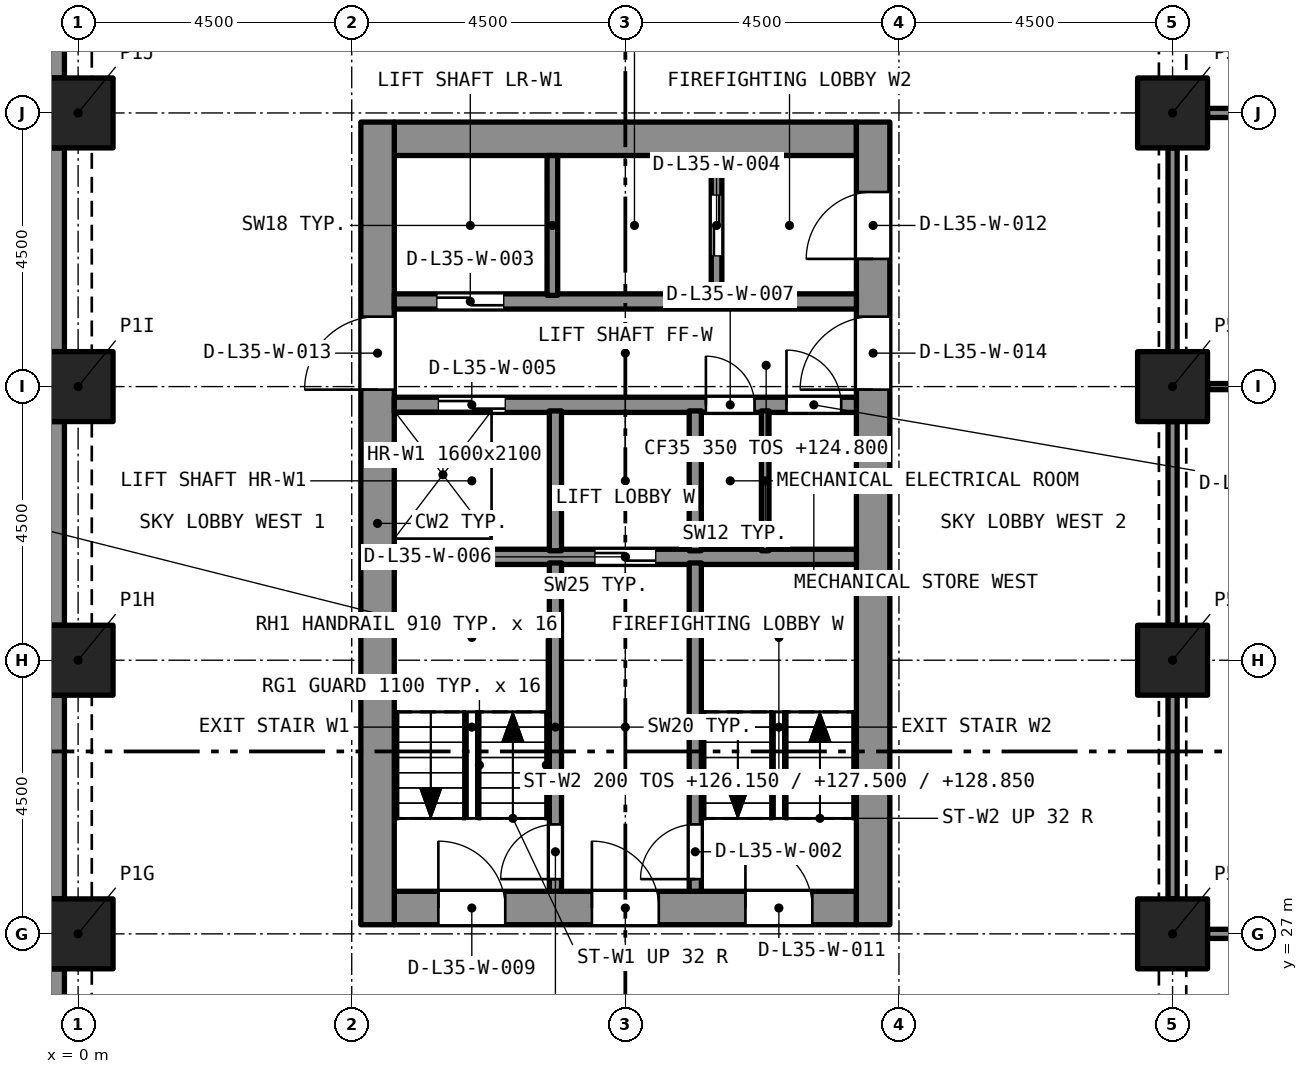
"""IFC4 building model, lengths in metres.
Left out: names, types, materials, properties, quantities, classifications, styles, units other than length and angle.
Written with IfcOpenShell. Run it as: python <this file> out.ifc"""

import sys

from ifc_helpers import new_model, si_unit, direction, frame, frame_2d, origin, origin_2d, place, context, subcontext, project, spatial, rectangle, extrude, element, fill, save


model = new_model("IFC4")
c1 = context("Model", 3, precision=1e-05, world=origin(), true_north=direction((0.0, 1.0)))
c2 = subcontext(c1, "Body", "Model", "MODEL_VIEW")
j1 = project(units=[si_unit("LENGTHUNIT", "METRE"), si_unit("PLANEANGLEUNIT", "RADIAN")], contexts=[c1])
p1 = place(None, origin())
s1 = spatial("IfcSite", under=j1, at=p1, CompositionType="ELEMENT")
p2 = place(p1, origin())
s2 = spatial("IfcBuilding", under=s1, at=p2, CompositionType="ELEMENT")
p3 = place(p2, frame((0.0, 0.0, 124.8)))
s3 = spatial("IfcBuildingStorey", under=s2, at=p3, CompositionType="ELEMENT", Elevation=124.8)
for number, where, z_axis, x_axis in (
    (1, (0.0, 27.0, 0.0), (0.0, 0.0, 1.0), (1.0, 0.0, 0.0)),
    (2, (18.0, 27.0, 0.0), (0.0, 0.0, 1.0), (1.0, 0.0, 0.0)),
    (3, (0.0, 31.5, 0.0), (0.0, 0.0, 1.0), (1.0, 0.0, 0.0)),
    (4, (18.0, 31.5, 0.0), (0.0, 0.0, 1.0), (1.0, 0.0, 0.0)),
    (5, (0.0, 36.0, 0.0), (0.0, 0.0, 1.0), (1.0, 0.0, 0.0)),
    (6, (18.0, 36.0, 0.0), (0.0, 0.0, 1.0), (1.0, 0.0, 0.0)),
    (7, (0.0, 40.5, 0.0), (0.0, 0.0, 1.0), (1.0, 0.0, 0.0)),
    (8, (18.0, 40.5, 0.0), (0.0, 0.0, 1.0), (1.0, 0.0, 0.0)),
):
    element("IfcColumn", number, at=place(p3, frame(where, z_axis=z_axis, x_axis=x_axis)), inside=s3, PredefinedType="COLUMN", context=c2, shape_type="SweptSolid", body=[
        extrude(rectangle(XDim=1.15, YDim=1.15, at=origin_2d()), origin(), (0.0, 0.0, 1.0), 5.4),
    ])
p4 = place(p3, frame((5.2, 27.425, 0.0), z_axis=(0.0, 0.0, 1.0), x_axis=(1.0, 0.0, 0.0)))
e9 = element("IfcWall", 9, at=p4, inside=s3, PredefinedType="SOLIDWALL", context=c2, shape_type="SweptSolid", body=[
    extrude(rectangle(XDim=7.6, YDim=0.55, at=frame_2d((3.8, 0.0))), origin(), (0.0, 0.0, 1.0), 5.4),
])
p5 = place(p4, frame((0.725, 0.0, 0.0)))
e10 = element("IfcOpeningElement", 10, at=p5, cuts=e9, PredefinedType="OPENING", context=c2, shape_type="SweptSolid", body=[
    extrude(rectangle(XDim=1.1, YDim=2.1, at=frame_2d((0.55, 1.05))), frame((0.0, 0.285, 0.0), z_axis=(0.0, -1.0, 0.0), x_axis=(1.0, 0.0, 0.0)), (0.0, 0.0, 1.0), 0.57),
])
p6 = place(p4, frame((3.25, 0.0, 0.0)))
e11 = element("IfcOpeningElement", 11, at=p6, cuts=e9, PredefinedType="OPENING", context=c2, shape_type="SweptSolid", body=[
    extrude(rectangle(XDim=1.1, YDim=2.1, at=frame_2d((0.55, 1.05))), frame((0.0, 0.285, 0.0), z_axis=(0.0, -1.0, 0.0), x_axis=(1.0, 0.0, 0.0)), (0.0, 0.0, 1.0), 0.57),
])
p7 = place(p4, frame((5.775, 0.0, 0.0)))
e12 = element("IfcOpeningElement", 12, at=p7, cuts=e9, PredefinedType="OPENING", context=c2, shape_type="SweptSolid", body=[
    extrude(rectangle(XDim=1.1, YDim=2.1, at=frame_2d((0.55, 1.05))), frame((0.0, 0.285, 0.0), z_axis=(0.0, -1.0, 0.0), x_axis=(1.0, 0.0, 0.0)), (0.0, 0.0, 1.0), 0.57),
])
p8 = place(p3, frame((5.2, 40.075, 0.0), z_axis=(0.0, 0.0, 1.0), x_axis=(1.0, 0.0, 0.0)))
e13 = element("IfcWall", 13, at=p8, inside=s3, PredefinedType="SOLIDWALL", context=c2, shape_type="SweptSolid", body=[
    extrude(rectangle(XDim=7.6, YDim=0.55, at=frame_2d((3.8, 0.0))), origin(), (0.0, 0.0, 1.0), 5.4),
])
p9 = place(p3, frame((4.925, 27.15, 0.0), z_axis=(0.0, 0.0, 1.0), x_axis=(0.0, 1.0, 0.0)))
e14 = element("IfcWall", 14, at=p9, inside=s3, PredefinedType="SOLIDWALL", context=c2, shape_type="SweptSolid", body=[
    extrude(rectangle(XDim=13.2, YDim=0.55, at=frame_2d((6.6, 0.0))), origin(), (0.0, 0.0, 1.0), 5.4),
])
p10 = place(p9, frame((8.8, 0.0, 0.0)))
e15 = element("IfcOpeningElement", 15, at=p10, cuts=e14, PredefinedType="OPENING", context=c2, shape_type="SweptSolid", body=[
    extrude(rectangle(XDim=1.2, YDim=2.1, at=frame_2d((0.6, 1.05))), frame((0.0, 0.285, 0.0), z_axis=(0.0, -1.0, 0.0), x_axis=(1.0, 0.0, 0.0)), (0.0, 0.0, 1.0), 0.57),
])
p11 = place(p3, frame((13.075, 27.15, 0.0), z_axis=(0.0, 0.0, 1.0), x_axis=(0.0, 1.0, 0.0)))
e16 = element("IfcWall", 16, at=p11, inside=s3, PredefinedType="SOLIDWALL", context=c2, shape_type="SweptSolid", body=[
    extrude(rectangle(XDim=13.2, YDim=0.55, at=frame_2d((6.6, 0.0))), origin(), (0.0, 0.0, 1.0), 5.4),
])
p12 = place(p11, frame((10.95, 0.0, 0.0)))
e17 = element("IfcOpeningElement", 17, at=p12, cuts=e16, PredefinedType="OPENING", context=c2, shape_type="SweptSolid", body=[
    extrude(rectangle(XDim=1.1, YDim=2.1, at=frame_2d((0.55, 1.05))), frame((0.0, 0.285, 0.0), z_axis=(0.0, -1.0, 0.0), x_axis=(1.0, 0.0, 0.0)), (0.0, 0.0, 1.0), 0.57),
])
p13 = place(p11, frame((8.8, 0.0, 0.0)))
e18 = element("IfcOpeningElement", 18, at=p13, cuts=e16, PredefinedType="OPENING", context=c2, shape_type="SweptSolid", body=[
    extrude(rectangle(XDim=1.2, YDim=2.1, at=frame_2d((0.6, 1.05))), frame((0.0, 0.285, 0.0), z_axis=(0.0, -1.0, 0.0), x_axis=(1.0, 0.0, 0.0)), (0.0, 0.0, 1.0), 0.57),
])
for number, where, z_axis, x_axis in (
    (19, (-0.375, 41.075, 0.0), (0.0, 0.0, 1.0), (0.0, 1.0, 0.0)),
    (20, (-0.375, 36.575, 0.0), (0.0, 0.0, 1.0), (0.0, 1.0, 0.0)),
    (21, (-0.375, 32.075, 0.0), (0.0, 0.0, 1.0), (0.0, 1.0, 0.0)),
    (22, (-0.375, 27.575, 0.0), (0.0, 0.0, 1.0), (0.0, 1.0, 0.0)),
    (23, (-0.375, 23.075, 0.0), (0.0, 0.0, 1.0), (0.0, 1.0, 0.0)),
):
    element("IfcWall", number, at=place(p3, frame(where, z_axis=z_axis, x_axis=x_axis)), inside=s3, PredefinedType="SOLIDWALL", context=c2, shape_type="SweptSolid", body=[
        extrude(rectangle(XDim=3.35, YDim=0.3, at=frame_2d((1.675, 0.0))), origin(), (0.0, 0.0, 1.0), 5.4),
    ])
p14 = place(p3, frame((5.2, 33.2, 0.0), z_axis=(0.0, 0.0, 1.0), x_axis=(1.0, 0.0, 0.0)))
e24 = element("IfcWall", 24, at=p14, inside=s3, PredefinedType="SOLIDWALL", context=c2, shape_type="SweptSolid", body=[
    extrude(rectangle(XDim=7.6, YDim=0.25, at=frame_2d((3.8, 0.0))), origin(), (0.0, 0.0, 1.0), 5.1),
])
p15 = place(p14, frame((3.3, 0.0, 0.0)))
e25 = element("IfcOpeningElement", 25, at=p15, cuts=e24, PredefinedType="OPENING", context=c2, shape_type="SweptSolid", body=[
    extrude(rectangle(XDim=1.0, YDim=2.1, at=frame_2d((0.5, 1.05))), frame((0.0, 0.135, 0.0), z_axis=(0.0, -1.0, 0.0), x_axis=(1.0, 0.0, 0.0)), (0.0, 0.0, 1.0), 0.27),
])
p16 = place(p3, frame((5.2, 35.7, 0.0), z_axis=(0.0, 0.0, 1.0), x_axis=(1.0, 0.0, 0.0)))
e26 = element("IfcWall", 26, at=p16, inside=s3, PredefinedType="SOLIDWALL", context=c2, shape_type="SweptSolid", body=[
    extrude(rectangle(XDim=7.6, YDim=0.25, at=frame_2d((3.8, 0.0))), origin(), (0.0, 0.0, 1.0), 5.1),
])
p17 = place(p16, frame((0.725, 0.0, 0.0)))
e27 = element("IfcOpeningElement", 27, at=p17, cuts=e26, PredefinedType="OPENING", context=c2, shape_type="SweptSolid", body=[
    extrude(rectangle(XDim=1.1, YDim=2.4, at=frame_2d((0.55, 1.2))), frame((0.0, 0.135, 0.0), z_axis=(0.0, -1.0, 0.0), x_axis=(1.0, 0.0, 0.0)), (0.0, 0.0, 1.0), 0.27),
])
p18 = place(p16, frame((5.125, 0.0, 0.0)))
e28 = element("IfcOpeningElement", 28, at=p18, cuts=e26, PredefinedType="OPENING", context=c2, shape_type="SweptSolid", body=[
    extrude(rectangle(XDim=0.8, YDim=2.1, at=frame_2d((0.4, 1.05))), frame((0.0, 0.135, 0.0), z_axis=(0.0, -1.0, 0.0), x_axis=(1.0, 0.0, 0.0)), (0.0, 0.0, 1.0), 0.27),
])
p19 = place(p16, frame((6.45, 0.0, 0.0)))
e29 = element("IfcOpeningElement", 29, at=p19, cuts=e26, PredefinedType="OPENING", context=c2, shape_type="SweptSolid", body=[
    extrude(rectangle(XDim=0.9, YDim=2.1, at=frame_2d((0.45, 1.05))), frame((0.0, 0.135, 0.0), z_axis=(0.0, -1.0, 0.0), x_axis=(1.0, 0.0, 0.0)), (0.0, 0.0, 1.0), 0.27),
])
p20 = place(p3, frame((5.2, 37.4, 0.0), z_axis=(0.0, 0.0, 1.0), x_axis=(1.0, 0.0, 0.0)))
e30 = element("IfcWall", 30, at=p20, inside=s3, PredefinedType="SOLIDWALL", context=c2, shape_type="SweptSolid", body=[
    extrude(rectangle(XDim=7.6, YDim=0.25, at=frame_2d((3.8, 0.0))), origin(), (0.0, 0.0, 1.0), 5.1),
])
p21 = place(p20, frame((0.7, 0.0, 0.0)))
e31 = element("IfcOpeningElement", 31, at=p21, cuts=e30, PredefinedType="OPENING", context=c2, shape_type="SweptSolid", body=[
    extrude(rectangle(XDim=1.1, YDim=2.4, at=frame_2d((0.55, 1.2))), frame((0.0, 0.135, 0.0), z_axis=(0.0, -1.0, 0.0), x_axis=(1.0, 0.0, 0.0)), (0.0, 0.0, 1.0), 0.27),
])
p22 = place(p3, frame((7.85, 27.7, 0.0), z_axis=(0.0, 0.0, 1.0), x_axis=(0.0, 1.0, 0.0)))
e32 = element("IfcWall", 32, at=p22, inside=s3, PredefinedType="SOLIDWALL", context=c2, shape_type="SweptSolid", body=[
    extrude(rectangle(XDim=5.4, YDim=0.2, at=frame_2d((2.7, 0.0))), origin(), (0.0, 0.0, 1.0), 5.1),
])
p23 = place(p22, frame((0.2, 0.0, 0.0)))
e33 = element("IfcOpeningElement", 33, at=p23, cuts=e32, PredefinedType="OPENING", context=c2, shape_type="SweptSolid", body=[
    extrude(rectangle(XDim=0.9, YDim=2.1, at=frame_2d((0.45, 1.05))), frame((0.0, 0.11, 0.0), z_axis=(0.0, -1.0, 0.0), x_axis=(1.0, 0.0, 0.0)), (0.0, 0.0, 1.0), 0.22),
])
p24 = place(p3, frame((10.15, 27.7, 0.0), z_axis=(0.0, 0.0, 1.0), x_axis=(0.0, 1.0, 0.0)))
e34 = element("IfcWall", 34, at=p24, inside=s3, PredefinedType="SOLIDWALL", context=c2, shape_type="SweptSolid", body=[
    extrude(rectangle(XDim=5.4, YDim=0.2, at=frame_2d((2.7, 0.0))), origin(), (0.0, 0.0, 1.0), 5.1),
])
p25 = place(p24, frame((0.2, 0.0, 0.0)))
e35 = element("IfcOpeningElement", 35, at=p25, cuts=e34, PredefinedType="OPENING", context=c2, shape_type="SweptSolid", body=[
    extrude(rectangle(XDim=0.9, YDim=2.1, at=frame_2d((0.45, 1.05))), frame((0.0, 0.11, 0.0), z_axis=(0.0, -1.0, 0.0), x_axis=(1.0, 0.0, 0.0)), (0.0, 0.0, 1.0), 0.22),
])
for number, where, z_axis, x_axis in (
    (36, (7.85, 33.3, 0.0), (0.0, 0.0, 1.0), (0.0, 1.0, 0.0)),
    (37, (10.15, 33.3, 0.0), (0.0, 0.0, 1.0), (0.0, 1.0, 0.0)),
):
    element("IfcWall", number, at=place(p3, frame(where, z_axis=z_axis, x_axis=x_axis)), inside=s3, PredefinedType="SOLIDWALL", context=c2, shape_type="SweptSolid", body=[
        extrude(rectangle(XDim=2.3, YDim=0.2, at=frame_2d((1.15, 0.0))), origin(), (0.0, 0.0, 1.0), 5.1),
    ])
p26 = place(p3, frame((7.8, 37.5, 0.0), z_axis=(0.0, 0.0, 1.0), x_axis=(0.0, 1.0, 0.0)))
e38 = element("IfcWall", 38, at=p26, inside=s3, PredefinedType="SOLIDWALL", context=c2, shape_type="SweptSolid", body=[
    extrude(rectangle(XDim=2.3, YDim=0.175, at=frame_2d((1.15, 0.0))), origin(), (0.0, 0.0, 1.0), 5.1),
])
p27 = place(p3, frame((10.5, 37.5, 0.0), z_axis=(0.0, 0.0, 1.0), x_axis=(0.0, 1.0, 0.0)))
e39 = element("IfcWall", 39, at=p27, inside=s3, PredefinedType="SOLIDWALL", context=c2, shape_type="SweptSolid", body=[
    extrude(rectangle(XDim=2.3, YDim=0.175, at=frame_2d((1.15, 0.0))), origin(), (0.0, 0.0, 1.0), 5.1),
])
p28 = place(p27, frame((0.65, 0.0, 0.0)))
e40 = element("IfcOpeningElement", 40, at=p28, cuts=e39, PredefinedType="OPENING", context=c2, shape_type="SweptSolid", body=[
    extrude(rectangle(XDim=1.0, YDim=2.1, at=frame_2d((0.5, 1.05))), frame((0.0, 0.097, 0.0), z_axis=(0.0, -1.0, 0.0), x_axis=(1.0, 0.0, 0.0)), (0.0, 0.0, 1.0), 0.195),
])
p29 = place(p3, frame((11.3, 33.3, 0.0), z_axis=(0.0, 0.0, 1.0), x_axis=(0.0, 1.0, 0.0)))
e41 = element("IfcWall", 41, at=p29, inside=s3, PredefinedType="PARTITIONING", context=c2, shape_type="SweptSolid", body=[
    extrude(rectangle(XDim=2.3, YDim=0.125, at=frame_2d((1.15, 0.0))), origin(), (0.0, 0.0, 1.0), 5.1),
])
p30 = place(p3, frame((18.575, 27.0, 0.0), z_axis=(0.0, 0.0, 1.0), x_axis=(1.0, 0.0, 0.0)))
e42 = element("IfcWall", 42, at=p30, inside=s3, PredefinedType="PARTITIONING", context=c2, shape_type="SweptSolid", body=[
    extrude(rectangle(XDim=12.35, YDim=0.15, at=frame_2d((6.175, 0.0))), origin(), (0.0, 0.0, 1.0), 4.95),
])
p31 = place(p30, frame((5.425, 0.0, 0.0)))
e43 = element("IfcOpeningElement", 43, at=p31, cuts=e42, PredefinedType="OPENING", context=c2, shape_type="SweptSolid", body=[
    extrude(rectangle(XDim=1.5, YDim=2.4, at=frame_2d((0.75, 1.2))), frame((0.0, 0.085, 0.0), z_axis=(0.0, -1.0, 0.0), x_axis=(1.0, 0.0, 0.0)), (0.0, 0.0, 1.0), 0.17),
])
p32 = place(p3, frame((18.575, 36.0, 0.0), z_axis=(0.0, 0.0, 1.0), x_axis=(1.0, 0.0, 0.0)))
e44 = element("IfcWall", 44, at=p32, inside=s3, PredefinedType="PARTITIONING", context=c2, shape_type="SweptSolid", body=[
    extrude(rectangle(XDim=12.35, YDim=0.1, at=frame_2d((6.175, 0.0))), origin(), (0.0, 0.0, 1.0), 4.95),
])
for number, where, z_axis, x_axis in (
    (45, (18.0, 27.575, 0.0), (0.0, 0.0, 1.0), (0.0, 1.0, 0.0)),
    (46, (18.0, 32.075, 0.0), (0.0, 0.0, 1.0), (0.0, 1.0, 0.0)),
):
    element("IfcWall", number, at=place(p3, frame(where, z_axis=z_axis, x_axis=x_axis)), inside=s3, PredefinedType="PARTITIONING", context=c2, shape_type="SweptSolid", body=[
        extrude(rectangle(XDim=3.35, YDim=0.15, at=frame_2d((1.675, 0.0))), origin(), (0.0, 0.0, 1.0), 4.58),
    ])
p33 = place(p3, frame((30.925, 40.5, 0.0), z_axis=(0.0, 0.0, 1.0), x_axis=(-1.0, 0.0, 0.0)))
e47 = element("IfcWall", 47, at=p33, inside=s3, PredefinedType="PARTITIONING", context=c2, shape_type="SweptSolid", body=[
    extrude(rectangle(XDim=12.35, YDim=0.15, at=frame_2d((6.175, 0.0))), origin(), (0.0, 0.0, 1.0), 4.95),
])
p34 = place(p33, frame((5.425, 0.0, 0.0)))
e48 = element("IfcOpeningElement", 48, at=p34, cuts=e47, PredefinedType="OPENING", context=c2, shape_type="SweptSolid", body=[
    extrude(rectangle(XDim=1.5, YDim=2.4, at=frame_2d((0.75, 1.2))), frame((0.0, 0.085, 0.0), z_axis=(0.0, -1.0, 0.0), x_axis=(1.0, 0.0, 0.0)), (0.0, 0.0, 1.0), 0.17),
])
p35 = place(p3, frame((18.0, 36.575, 0.0), z_axis=(0.0, 0.0, 1.0), x_axis=(0.0, 1.0, 0.0)))
e49 = element("IfcWall", 49, at=p35, inside=s3, PredefinedType="PARTITIONING", context=c2, shape_type="SweptSolid", body=[
    extrude(rectangle(XDim=3.35, YDim=0.15, at=frame_2d((1.675, 0.0))), origin(), (0.0, 0.0, 1.0), 4.58),
])
p36 = place(p23, origin())
e50 = element("IfcDoor", 50, at=p36, inside=s3, OperationType="SINGLE_SWING_LEFT", PredefinedType="DOOR", context=c2, shape_type="SweptSolid", body=[
    extrude(rectangle(XDim=0.9, YDim=2.1, at=frame_2d((0.45, 1.05))), frame((0.0, 0.025, 0.0), z_axis=(0.0, -1.0, 0.0), x_axis=(1.0, 0.0, 0.0)), (0.0, 0.0, 1.0), 0.05),
])
fill(e33, e50)
p37 = place(p25, origin())
e51 = element("IfcDoor", 51, at=p37, inside=s3, OperationType="SINGLE_SWING_LEFT", PredefinedType="DOOR", context=c2, shape_type="SweptSolid", body=[
    extrude(rectangle(XDim=0.9, YDim=2.1, at=frame_2d((0.45, 1.05))), frame((0.0, 0.025, 0.0), z_axis=(0.0, -1.0, 0.0), x_axis=(1.0, 0.0, 0.0)), (0.0, 0.0, 1.0), 0.05),
])
fill(e35, e51)
p38 = place(p21, origin())
e52 = element("IfcDoor", 52, at=p38, inside=s3, OperationType="SLIDING_TO_LEFT", PredefinedType="DOOR", context=c2, shape_type="SweptSolid", body=[
    extrude(rectangle(XDim=1.1, YDim=2.4, at=frame_2d((0.55, 1.2))), frame((0.0, 0.025, 0.0), z_axis=(0.0, -1.0, 0.0), x_axis=(1.0, 0.0, 0.0)), (0.0, 0.0, 1.0), 0.05),
])
fill(e31, e52)
p39 = place(p28, origin())
e53 = element("IfcDoor", 53, at=p39, inside=s3, OperationType="SLIDING_TO_LEFT", PredefinedType="DOOR", context=c2, shape_type="SweptSolid", body=[
    extrude(rectangle(XDim=1.0, YDim=2.1, at=frame_2d((0.5, 1.05))), frame((0.0, 0.025, 0.0), z_axis=(0.0, -1.0, 0.0), x_axis=(1.0, 0.0, 0.0)), (0.0, 0.0, 1.0), 0.05),
])
fill(e40, e53)
p40 = place(p17, origin())
e54 = element("IfcDoor", 54, at=p40, inside=s3, OperationType="SLIDING_TO_LEFT", PredefinedType="DOOR", context=c2, shape_type="SweptSolid", body=[
    extrude(rectangle(XDim=1.1, YDim=2.4, at=frame_2d((0.55, 1.2))), frame((0.0, 0.025, 0.0), z_axis=(0.0, -1.0, 0.0), x_axis=(1.0, 0.0, 0.0)), (0.0, 0.0, 1.0), 0.05),
])
fill(e27, e54)
p41 = place(p15, origin())
e55 = element("IfcDoor", 55, at=p41, inside=s3, OperationType="SLIDING_TO_LEFT", PredefinedType="DOOR", context=c2, shape_type="SweptSolid", body=[
    extrude(rectangle(XDim=1.0, YDim=2.1, at=frame_2d((0.5, 1.05))), frame((0.0, 0.025, 0.0), z_axis=(0.0, -1.0, 0.0), x_axis=(1.0, 0.0, 0.0)), (0.0, 0.0, 1.0), 0.05),
])
fill(e25, e55)
p42 = place(p18, origin())
e56 = element("IfcDoor", 56, at=p42, inside=s3, OperationType="SINGLE_SWING_LEFT", PredefinedType="DOOR", context=c2, shape_type="SweptSolid", body=[
    extrude(rectangle(XDim=0.8, YDim=2.1, at=frame_2d((0.4, 1.05))), frame((0.0, 0.025, 0.0), z_axis=(0.0, -1.0, 0.0), x_axis=(1.0, 0.0, 0.0)), (0.0, 0.0, 1.0), 0.05),
])
fill(e28, e56)
p43 = place(p19, origin())
e57 = element("IfcDoor", 57, at=p43, inside=s3, OperationType="SINGLE_SWING_LEFT", PredefinedType="DOOR", context=c2, shape_type="SweptSolid", body=[
    extrude(rectangle(XDim=0.9, YDim=2.1, at=frame_2d((0.45, 1.05))), frame((0.0, 0.025, 0.0), z_axis=(0.0, -1.0, 0.0), x_axis=(1.0, 0.0, 0.0)), (0.0, 0.0, 1.0), 0.05),
])
fill(e29, e57)
p44 = place(p5, origin())
e58 = element("IfcDoor", 58, at=p44, inside=s3, OperationType="SINGLE_SWING_LEFT", PredefinedType="DOOR", context=c2, shape_type="SweptSolid", body=[
    extrude(rectangle(XDim=1.1, YDim=2.1, at=frame_2d((0.55, 1.05))), frame((0.0, 0.025, 0.0), z_axis=(0.0, -1.0, 0.0), x_axis=(1.0, 0.0, 0.0)), (0.0, 0.0, 1.0), 0.05),
])
fill(e10, e58)
p45 = place(p6, origin())
e59 = element("IfcDoor", 59, at=p45, inside=s3, OperationType="SINGLE_SWING_LEFT", PredefinedType="DOOR", context=c2, shape_type="SweptSolid", body=[
    extrude(rectangle(XDim=1.1, YDim=2.1, at=frame_2d((0.55, 1.05))), frame((0.0, 0.025, 0.0), z_axis=(0.0, -1.0, 0.0), x_axis=(1.0, 0.0, 0.0)), (0.0, 0.0, 1.0), 0.05),
])
fill(e11, e59)
p46 = place(p7, origin())
e60 = element("IfcDoor", 60, at=p46, inside=s3, OperationType="SINGLE_SWING_LEFT", PredefinedType="DOOR", context=c2, shape_type="SweptSolid", body=[
    extrude(rectangle(XDim=1.1, YDim=2.1, at=frame_2d((0.55, 1.05))), frame((0.0, 0.025, 0.0), z_axis=(0.0, -1.0, 0.0), x_axis=(1.0, 0.0, 0.0)), (0.0, 0.0, 1.0), 0.05),
])
fill(e12, e60)
p47 = place(p12, origin())
e61 = element("IfcDoor", 61, at=p47, inside=s3, OperationType="SINGLE_SWING_LEFT", PredefinedType="DOOR", context=c2, shape_type="SweptSolid", body=[
    extrude(rectangle(XDim=1.1, YDim=2.1, at=frame_2d((0.55, 1.05))), frame((0.0, 0.025, 0.0), z_axis=(0.0, -1.0, 0.0), x_axis=(1.0, 0.0, 0.0)), (0.0, 0.0, 1.0), 0.05),
])
fill(e17, e61)
p48 = place(p10, origin())
e62 = element("IfcDoor", 62, at=p48, inside=s3, OperationType="SINGLE_SWING_LEFT", PredefinedType="DOOR", context=c2, shape_type="SweptSolid", body=[
    extrude(rectangle(XDim=1.2, YDim=2.1, at=frame_2d((0.6, 1.05))), frame((0.0, 0.025, 0.0), z_axis=(0.0, -1.0, 0.0), x_axis=(1.0, 0.0, 0.0)), (0.0, 0.0, 1.0), 0.05),
])
fill(e15, e62)
p49 = place(p13, origin())
e63 = element("IfcDoor", 63, at=p49, inside=s3, OperationType="SINGLE_SWING_LEFT", PredefinedType="DOOR", context=c2, shape_type="SweptSolid", body=[
    extrude(rectangle(XDim=1.2, YDim=2.1, at=frame_2d((0.6, 1.05))), frame((0.0, 0.025, 0.0), z_axis=(0.0, -1.0, 0.0), x_axis=(1.0, 0.0, 0.0)), (0.0, 0.0, 1.0), 0.05),
])
fill(e18, e63)
save(model, sys.argv[1])
